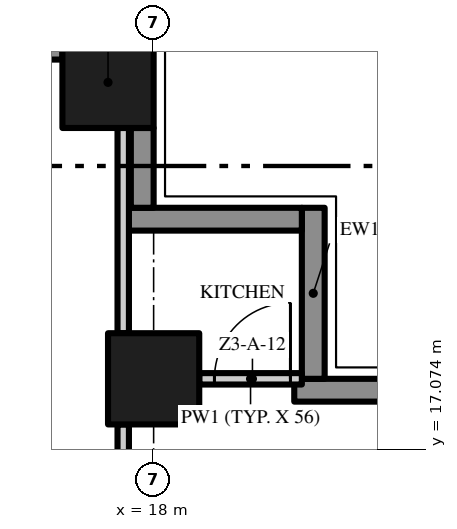
"""IFC4 building model, lengths in metres.
Left out: names, types, materials, properties, quantities, classifications, styles, units other than length and angle.
Written with IfcOpenShell. Run it as: python <this file> out.ifc"""

import sys

from ifc_helpers import new_model, si_unit, direction, frame, frame_2d, origin, origin_2d, place, context, subcontext, project, spatial, rectangle, extrude, element, fill, save


model = new_model("IFC4")
c1 = context("Model", 3, precision=1e-05, world=origin(), true_north=direction((0.0, 1.0)))
c2 = subcontext(c1, "Body", "Model", "MODEL_VIEW")
j1 = project(units=[si_unit("LENGTHUNIT", "METRE"), si_unit("PLANEANGLEUNIT", "RADIAN")], contexts=[c1])
p1 = place(None, origin())
s1 = spatial("IfcSite", under=j1, at=p1, CompositionType="ELEMENT")
p2 = place(p1, origin())
s2 = spatial("IfcBuilding", under=s1, at=p2, CompositionType="ELEMENT")
p3 = place(p2, frame((0.0, 0.0, 125.0)))
s3 = spatial("IfcBuildingStorey", under=s2, at=p3, CompositionType="ELEMENT", Elevation=125.0)
for number, where, z_axis, x_axis in (
    (1, (17.4, 21.9, 0.0), (0.0, 0.0, 1.0), (1.0, 0.0, 0.0)),
    (2, (18.0, 18.0, 0.0), (0.0, 0.0, 1.0), (1.0, 0.0, 0.0)),
):
    element("IfcColumn", number, at=place(p3, frame(where, z_axis=z_axis, x_axis=x_axis)), inside=s3, PredefinedType="COLUMN", context=c2, shape_type="SweptSolid", body=[
        extrude(rectangle(XDim=1.2, YDim=1.2, at=origin_2d()), origin(), (0.0, 0.0, 1.0), 3.5),
    ])
p4 = place(p3, frame((19.85, 17.85, 0.0), z_axis=(0.0, 0.0, 1.0), x_axis=(1.0, 0.0, 0.0)))
e3 = element("IfcWall", 3, at=p4, inside=s3, PredefinedType="SOLIDWALL", context=c2, shape_type="SweptSolid", body=[
    extrude(rectangle(XDim=2.35, YDim=0.3, at=frame_2d((1.175, 0.0))), origin(), (0.0, 0.0, 1.0), 3.5),
])
p5 = place(p3, frame((20.1, 20.25, 0.0), z_axis=(0.0, 0.0, 1.0), x_axis=(0.0, -1.0, 0.0)))
e4 = element("IfcWall", 4, at=p5, inside=s3, PredefinedType="SOLIDWALL", context=c2, shape_type="SweptSolid", body=[
    extrude(rectangle(XDim=2.25, YDim=0.3, at=frame_2d((1.125, 0.0))), origin(), (0.0, 0.0, 1.0), 3.5),
])
p6 = place(p3, frame((17.6, 20.1, 0.0), z_axis=(0.0, 0.0, 1.0), x_axis=(1.0, 0.0, 0.0)))
e5 = element("IfcWall", 5, at=p6, inside=s3, PredefinedType="SOLIDWALL", context=c2, shape_type="SweptSolid", body=[
    extrude(rectangle(XDim=2.35, YDim=0.3, at=frame_2d((1.175, 0.0))), origin(), (0.0, 0.0, 1.0), 3.5),
])
p7 = place(p3, frame((17.85, 21.3, 0.0), z_axis=(0.0, 0.0, 1.0), x_axis=(0.0, -1.0, 0.0)))
e6 = element("IfcWall", 6, at=p7, inside=s3, PredefinedType="SOLIDWALL", context=c2, shape_type="SweptSolid", body=[
    extrude(rectangle(XDim=1.05, YDim=0.3, at=frame_2d((0.525, 0.0))), origin(), (0.0, 0.0, 1.0), 3.5),
])
p8 = place(p3, frame((13.5, 22.35, 0.0), z_axis=(0.0, 0.0, 1.0), x_axis=(1.0, 0.0, 0.0)))
e7 = element("IfcWall", 7, at=p8, inside=s3, PredefinedType="SOLIDWALL", context=c2, shape_type="SweptSolid", body=[
    extrude(rectangle(XDim=3.3, YDim=0.3, at=frame_2d((1.65, 0.0))), origin(), (0.0, 0.0, 1.0), 3.5),
])
p9 = place(p8, frame((1.2, 0.0, 0.0)))
e8 = element("IfcOpeningElement", 8, at=p9, cuts=e7, PredefinedType="OPENING", context=c2, shape_type="SweptSolid", body=[
    extrude(rectangle(XDim=1.8, YDim=2.4, at=frame_2d((0.9, 1.2))), frame((0.0, 0.16, 0.0), z_axis=(0.0, -1.0, 0.0), x_axis=(1.0, 0.0, 0.0)), (0.0, 0.0, 1.0), 0.32),
])
p10 = place(p3, frame((18.6, 18.0, 0.0), z_axis=(0.0, 0.0, 1.0), x_axis=(1.0, 0.0, 0.0)))
e9 = element("IfcWall", 9, at=p10, inside=s3, PredefinedType="PARTITIONING", context=c2, shape_type="SweptSolid", body=[
    extrude(rectangle(XDim=1.35, YDim=0.15, at=frame_2d((0.675, 0.0))), origin(), (0.0, 0.0, 1.0), 3.5),
])
p11 = place(p10, frame((0.2, 0.0, 0.0)))
e10 = element("IfcOpeningElement", 10, at=p11, cuts=e9, PredefinedType="OPENING", context=c2, shape_type="SweptSolid", body=[
    extrude(rectangle(XDim=1.0, YDim=2.4, at=frame_2d((0.5, 1.2))), frame((0.0, 0.085, 0.0), z_axis=(0.0, -1.0, 0.0), x_axis=(1.0, 0.0, 0.0)), (0.0, 0.0, 1.0), 0.17),
])
p12 = place(p3, frame((17.6, 14.15, 0.0), z_axis=(0.0, 0.0, 1.0), x_axis=(0.0, 1.0, 0.0)))
e11 = element("IfcWall", 11, at=p12, inside=s3, PredefinedType="PARTITIONING", context=c2, shape_type="SweptSolid", body=[
    extrude(rectangle(XDim=3.25, YDim=0.15, at=frame_2d((1.625, 0.0))), origin(), (0.0, 0.0, 1.0), 3.5),
])
p13 = place(p3, frame((17.6, 18.6, 0.0), z_axis=(0.0, 0.0, 1.0), x_axis=(0.0, 1.0, 0.0)))
e12 = element("IfcWall", 12, at=p13, inside=s3, PredefinedType="PARTITIONING", context=c2, shape_type="SweptSolid", body=[
    extrude(rectangle(XDim=2.7, YDim=0.15, at=frame_2d((1.35, 0.0))), origin(), (0.0, 0.0, 1.0), 3.5),
])
p14 = place(p11, origin())
e13 = element("IfcDoor", 13, at=p14, inside=s3, OperationType="SINGLE_SWING_RIGHT", PredefinedType="DOOR", context=c2, shape_type="SweptSolid", body=[
    extrude(rectangle(XDim=1.0, YDim=2.4, at=frame_2d((0.5, 1.2))), frame((0.0, 0.025, 0.0), z_axis=(0.0, -1.0, 0.0), x_axis=(1.0, 0.0, 0.0)), (0.0, 0.0, 1.0), 0.05),
])
fill(e10, e13)
save(model, sys.argv[1])
